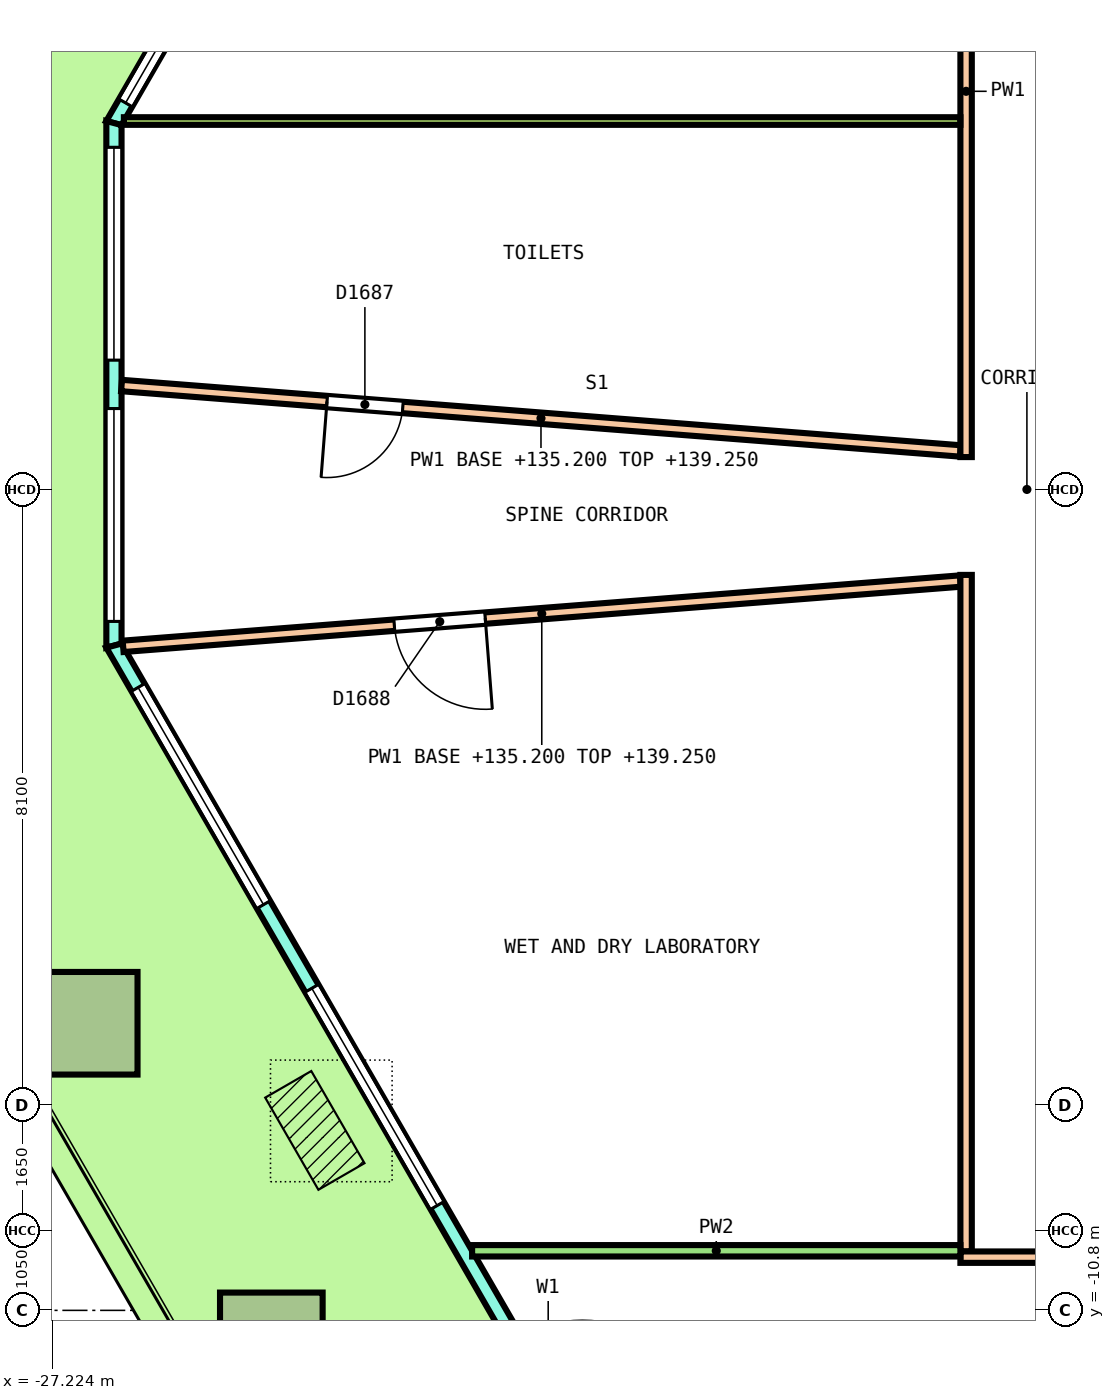
"""IFC4 building model, lengths in metres.
Left out: names, types, materials, properties, quantities, classifications, styles, units other than length and angle.
Written with IfcOpenShell. Run it as: python <this file> out.ifc"""

import sys

from ifc_helpers import new_model, si_unit, direction, frame, frame_2d, origin, origin_2d, place, context, subcontext, project, spatial, polyline, rectangle, outline, extrude, element, fill, save


model = new_model("IFC4")
c1 = context("Model", 3, precision=1e-05, world=origin(), true_north=direction((0.0, 1.0)))
c2 = subcontext(c1, "Body", "Model", "MODEL_VIEW")
j1 = project(units=[si_unit("LENGTHUNIT", "METRE"), si_unit("PLANEANGLEUNIT", "RADIAN")], contexts=[c1])
p1 = place(None, origin())
s1 = spatial("IfcSite", under=j1, at=p1, CompositionType="ELEMENT")
p2 = place(p1, origin())
s2 = spatial("IfcBuilding", under=s1, at=p2, CompositionType="ELEMENT")
p3 = place(p2, frame((0.0, 0.0, 135.2)))
s3 = spatial("IfcBuildingStorey", under=s2, at=p3, CompositionType="ELEMENT", Elevation=135.2)
p4 = place(p3, frame((-26.776, -7.023, 0.0), z_axis=(0.106402456539, -0.184226228858, 0.977107575369), x_axis=(0.488665296242, -0.846135593228, -0.212745825157)))
e1 = element("IfcColumn", 1, at=p4, inside=s3, PredefinedType="COLUMN", context=c2, shape_type="SweptSolid", body=[
    extrude(rectangle(XDim=1.35, YDim=1.35, at=origin_2d()), origin(), (0.0, 0.0, 1.0), 4.135),
])
p5 = place(p3, frame((-24.341, -11.241, 0.0), z_axis=(0.03619386332, -0.062707972497, 0.997375412993), x_axis=(0.498665845075, -0.863765066122, -0.072403629074)))
e2 = element("IfcColumn", 2, at=p5, inside=s3, PredefinedType="COLUMN", context=c2, shape_type="SweptSolid", body=[
    extrude(rectangle(XDim=1.35, YDim=1.35, at=origin_2d()), origin(), (0.0, 0.0, 1.0), 4.061),
])
p6 = place(p3, frame((-17.38, 20.463, 0.0), z_axis=(0.0, 0.0, 1.0), x_axis=(-0.500000137386, -0.866025324465, 0.0)))
e3 = element("IfcWall", 3, at=p6, inside=s3, PredefinedType="SOLIDWALL", context=c2, shape_type="SweptSolid", body=[
    extrude(outline(polyline([(-0.027, -0.1), (0.979, -0.1), (1.986, -0.1), (2.992, -0.1), (3.999, -0.1), (5.005, -0.1), (6.012, -0.1), (7.018, -0.1), (8.025, -0.1), (9.031, -0.1), (10.038, -0.1), (11.044, -0.1), (12.051, -0.1), (13.057, -0.1), (14.063, -0.1), (15.07, -0.1), (16.076, -0.1), (17.083, -0.1), (18.089, -0.1), (18.036, 0.1), (17.035, 0.1), (16.035, 0.1), (15.034, 0.1), (14.034, 0.1), (13.033, 0.1), (12.033, 0.1), (11.032, 0.1), (10.032, 0.1), (9.031, 0.1), (8.031, 0.1), (7.03, 0.1), (6.03, 0.1), (5.029, 0.1), (4.029, 0.1), (3.028, 0.1), (2.028, 0.1), (1.027, 0.1), (0.027, 0.1), (-0.027, -0.1)])), origin(), (0.0, 0.0, 1.0), 4.1),
])
p7 = place(p6, frame((0.306, 0.0, 0.1)))
e4 = element("IfcOpeningElement", 4, at=p7, cuts=e3, PredefinedType="OPENING", context=c2, shape_type="SweptSolid", body=[
    extrude(rectangle(XDim=3.0, YDim=2.9, at=frame_2d((1.5, 1.45))), frame((0.0, 0.11, 0.0), z_axis=(0.0, -1.0, 0.0), x_axis=(1.0, 0.0, 0.0)), (0.0, 0.0, 1.0), 0.22),
])
p8 = place(p6, frame((3.919, 0.0, 0.1)))
e5 = element("IfcOpeningElement", 5, at=p8, cuts=e3, PredefinedType="OPENING", context=c2, shape_type="SweptSolid", body=[
    extrude(rectangle(XDim=3.0, YDim=2.9, at=frame_2d((1.5, 1.45))), frame((0.0, 0.11, 0.0), z_axis=(0.0, -1.0, 0.0), x_axis=(1.0, 0.0, 0.0)), (0.0, 0.0, 1.0), 0.22),
])
p9 = place(p6, frame((8.131, 0.0, 0.0)))
e6 = element("IfcOpeningElement", 6, at=p9, cuts=e3, PredefinedType="OPENING", context=c2, shape_type="SweptSolid", body=[
    extrude(rectangle(XDim=1.8, YDim=2.4, at=frame_2d((0.9, 1.2))), frame((0.0, 0.11, 0.0), z_axis=(0.0, -1.0, 0.0), x_axis=(1.0, 0.0, 0.0)), (0.0, 0.0, 1.0), 0.22),
])
p10 = place(p6, frame((8.131, 0.0, 2.55)))
e7 = element("IfcOpeningElement", 7, at=p10, cuts=e3, PredefinedType="OPENING", context=c2, shape_type="SweptSolid", body=[
    extrude(rectangle(XDim=1.8, YDim=0.45, at=frame_2d((0.9, 0.225))), frame((0.0, 0.11, 0.0), z_axis=(0.0, -1.0, 0.0), x_axis=(1.0, 0.0, 0.0)), (0.0, 0.0, 1.0), 0.22),
])
p11 = place(p6, frame((11.144, 0.0, 0.1)))
e8 = element("IfcOpeningElement", 8, at=p11, cuts=e3, PredefinedType="OPENING", context=c2, shape_type="SweptSolid", body=[
    extrude(rectangle(XDim=3.0, YDim=2.9, at=frame_2d((1.5, 1.45))), frame((0.0, 0.11, 0.0), z_axis=(0.0, -1.0, 0.0), x_axis=(1.0, 0.0, 0.0)), (0.0, 0.0, 1.0), 0.22),
])
p12 = place(p6, frame((14.756, 0.0, 0.1)))
e9 = element("IfcOpeningElement", 9, at=p12, cuts=e3, PredefinedType="OPENING", context=c2, shape_type="SweptSolid", body=[
    extrude(rectangle(XDim=3.0, YDim=2.9, at=frame_2d((1.5, 1.45))), frame((0.0, 0.11, 0.0), z_axis=(0.0, -1.0, 0.0), x_axis=(1.0, 0.0, 0.0)), (0.0, 0.0, 1.0), 0.22),
])
p13 = place(p3, frame((-26.411, 4.82, 0.0), z_axis=(0.0, 0.0, 1.0), x_axis=(0.0, -1.0, 0.0)))
e10 = element("IfcWall", 10, at=p13, inside=s3, PredefinedType="SOLIDWALL", context=c2, shape_type="SweptSolid", body=[
    extrude(outline(polyline([(-0.027, -0.1), (1.128, -0.1), (2.283, -0.1), (3.438, -0.1), (4.592, -0.1), (5.747, -0.1), (6.902, -0.1), (6.848, 0.1), (5.711, 0.1), (4.574, 0.1), (3.438, 0.1), (2.301, 0.1), (1.164, 0.1), (0.027, 0.1), (-0.027, -0.1)])), origin(), (0.0, 0.0, 1.0), 4.1),
])
p14 = place(p13, frame((0.319, 0.0, 0.1)))
e11 = element("IfcOpeningElement", 11, at=p14, cuts=e10, PredefinedType="OPENING", context=c2, shape_type="SweptSolid", body=[
    extrude(rectangle(XDim=2.8, YDim=2.9, at=frame_2d((1.4, 1.45))), frame((0.0, 0.11, 0.0), z_axis=(0.0, -1.0, 0.0), x_axis=(1.0, 0.0, 0.0)), (0.0, 0.0, 1.0), 0.22),
])
p15 = place(p13, frame((3.756, 0.0, 0.1)))
e12 = element("IfcOpeningElement", 12, at=p15, cuts=e10, PredefinedType="OPENING", context=c2, shape_type="SweptSolid", body=[
    extrude(rectangle(XDim=2.8, YDim=2.9, at=frame_2d((1.4, 1.45))), frame((0.0, 0.11, 0.0), z_axis=(0.0, -1.0, 0.0), x_axis=(1.0, 0.0, 0.0)), (0.0, 0.0, 1.0), 0.22),
])
p16 = place(p3, frame((-26.411, -2.055, 0.0), z_axis=(0.0, 0.0, 1.0), x_axis=(0.50000204422, -0.86602422355, 0.0)))
e13 = element("IfcWall", 13, at=p16, inside=s3, PredefinedType="SOLIDWALL", context=c2, shape_type="SweptSolid", body=[
    extrude(outline(polyline([(-0.027, -0.1), (1.014, -0.1), (2.055, -0.1), (3.097, -0.1), (4.138, -0.1), (5.179, -0.1), (6.22, -0.1), (7.261, -0.1), (8.303, -0.1), (9.344, -0.1), (10.385, -0.1), (11.426, -0.1), (12.468, -0.1), (13.509, -0.1), (14.55, -0.1), (15.591, -0.1), (16.632, -0.1), (17.673, -0.1), (18.715, -0.1), (19.756, -0.1), (20.797, -0.1), (21.838, -0.1), (22.879, -0.1), (22.826, 0.1), (21.789, 0.1), (20.753, 0.1), (19.717, 0.1), (18.68, 0.1), (17.644, 0.1), (16.608, 0.1), (15.572, 0.1), (14.535, 0.1), (13.499, 0.1), (12.463, 0.1), (11.426, 0.1), (10.39, 0.1), (9.354, 0.1), (8.317, 0.1), (7.281, 0.1), (6.245, 0.1), (5.208, 0.1), (4.172, 0.1), (3.136, 0.1), (2.099, 0.1), (1.063, 0.1), (0.027, 0.1), (-0.027, -0.1)])), origin(), (0.0, 0.0, 1.0), 4.1),
])
p17 = place(p16, frame((0.635, 0.0, 0.1)))
e14 = element("IfcOpeningElement", 14, at=p17, cuts=e13, PredefinedType="OPENING", context=c2, shape_type="SweptSolid", body=[
    extrude(rectangle(XDim=3.3, YDim=2.9, at=frame_2d((1.65, 1.45))), frame((0.0, 0.11, 0.0), z_axis=(0.0, -1.0, 0.0), x_axis=(1.0, 0.0, 0.0)), (0.0, 0.0, 1.0), 0.22),
])
p18 = place(p16, frame((5.206, 0.0, 0.1)))
e15 = element("IfcOpeningElement", 15, at=p18, cuts=e13, PredefinedType="OPENING", context=c2, shape_type="SweptSolid", body=[
    extrude(rectangle(XDim=3.3, YDim=2.9, at=frame_2d((1.65, 1.45))), frame((0.0, 0.11, 0.0), z_axis=(0.0, -1.0, 0.0), x_axis=(1.0, 0.0, 0.0)), (0.0, 0.0, 1.0), 0.22),
])
p19 = place(p16, frame((10.526, 0.0, 0.0)))
e16 = element("IfcOpeningElement", 16, at=p19, cuts=e13, PredefinedType="OPENING", context=c2, shape_type="SweptSolid", body=[
    extrude(rectangle(XDim=1.8, YDim=2.4, at=frame_2d((0.9, 1.2))), frame((0.0, 0.11, 0.0), z_axis=(0.0, -1.0, 0.0), x_axis=(1.0, 0.0, 0.0)), (0.0, 0.0, 1.0), 0.22),
])
p20 = place(p16, frame((10.526, 0.0, 2.55)))
e17 = element("IfcOpeningElement", 17, at=p20, cuts=e13, PredefinedType="OPENING", context=c2, shape_type="SweptSolid", body=[
    extrude(rectangle(XDim=1.8, YDim=0.45, at=frame_2d((0.9, 0.225))), frame((0.0, 0.11, 0.0), z_axis=(0.0, -1.0, 0.0), x_axis=(1.0, 0.0, 0.0)), (0.0, 0.0, 1.0), 0.22),
])
p21 = place(p16, frame((14.347, 0.0, 0.1)))
e18 = element("IfcOpeningElement", 18, at=p21, cuts=e13, PredefinedType="OPENING", context=c2, shape_type="SweptSolid", body=[
    extrude(rectangle(XDim=3.3, YDim=2.9, at=frame_2d((1.65, 1.45))), frame((0.0, 0.11, 0.0), z_axis=(0.0, -1.0, 0.0), x_axis=(1.0, 0.0, 0.0)), (0.0, 0.0, 1.0), 0.22),
])
p22 = place(p16, frame((18.917, 0.0, 0.1)))
e19 = element("IfcOpeningElement", 19, at=p22, cuts=e13, PredefinedType="OPENING", context=c2, shape_type="SweptSolid", body=[
    extrude(rectangle(XDim=3.3, YDim=2.9, at=frame_2d((1.65, 1.45))), frame((0.0, 0.11, 0.0), z_axis=(0.0, -1.0, 0.0), x_axis=(1.0, 0.0, 0.0)), (0.0, 0.0, 1.0), 0.22),
])
p23 = place(p3, frame((-26.311, 1.367, 0.0), z_axis=(0.0, 0.0, 1.0), x_axis=(0.996973369859, -0.077743808706, 0.0)))
e20 = element("IfcWall", 20, at=p23, inside=s3, PredefinedType="PARTITIONING", context=c2, shape_type="SweptSolid", body=[
    extrude(rectangle(XDim=11.07, YDim=0.15, at=frame_2d((5.535, 0.0))), origin(), (0.0, 0.0, 1.0), 4.05),
])
p24 = place(p23, frame((2.711, 0.0, 0.0)))
e21 = element("IfcOpeningElement", 21, at=p24, cuts=e20, PredefinedType="OPENING", context=c2, shape_type="SweptSolid", body=[
    extrude(rectangle(XDim=1.0, YDim=2.1, at=frame_2d((0.5, 1.05))), frame((0.0, 0.085, 0.0), z_axis=(0.0, -1.0, 0.0), x_axis=(1.0, 0.0, 0.0)), (0.0, 0.0, 1.0), 0.17),
])
p25 = place(p3, frame((-26.29, -2.064, 0.0), z_axis=(0.0, 0.0, 1.0), x_axis=(0.99697229372, 0.077757607695, 0.0)))
e22 = element("IfcWall", 22, at=p25, inside=s3, PredefinedType="PARTITIONING", context=c2, shape_type="SweptSolid", body=[
    extrude(rectangle(XDim=11.049, YDim=0.15, at=frame_2d((5.524, 0.0))), origin(), (0.0, 0.0, 1.0), 4.05),
])
p26 = place(p25, frame((3.578, 0.0, 0.0)))
e23 = element("IfcOpeningElement", 23, at=p26, cuts=e22, PredefinedType="OPENING", context=c2, shape_type="SweptSolid", body=[
    extrude(rectangle(XDim=1.2, YDim=2.1, at=frame_2d((0.6, 1.05))), frame((0.0, 0.085, 0.0), z_axis=(0.0, -1.0, 0.0), x_axis=(1.0, 0.0, 0.0)), (0.0, 0.0, 1.0), 0.17),
])
p27 = place(p3, frame((-15.2, -10.025, 0.0), z_axis=(0.0, 0.0, 1.0), x_axis=(0.0, 1.0, 0.0)))
e24 = element("IfcWall", 24, at=p27, inside=s3, PredefinedType="PARTITIONING", context=c2, shape_type="SweptSolid", body=[
    extrude(rectangle(XDim=8.901, YDim=0.15, at=frame_2d((4.45, 0.0))), origin(), (0.0, 0.0, 1.0), 3.05),
])
p28 = place(p3, frame((-15.2, 0.426, 0.0), z_axis=(0.0, 0.0, 1.0), x_axis=(0.0, 1.0, 0.0)))
e25 = element("IfcWall", 25, at=p28, inside=s3, PredefinedType="PARTITIONING", context=c2, shape_type="SweptSolid", body=[
    extrude(rectangle(XDim=9.624, YDim=0.15, at=frame_2d((4.812, 0.0))), origin(), (0.0, 0.0, 1.0), 3.05),
])
p29 = place(p28, frame((6.951, 0.0, 0.0)))
e26 = element("IfcOpeningElement", 26, at=p29, cuts=e25, PredefinedType="OPENING", context=c2, shape_type="SweptSolid", body=[
    extrude(rectangle(XDim=1.2, YDim=2.1, at=frame_2d((0.6, 1.05))), frame((0.0, 0.085, 0.0), z_axis=(0.0, -1.0, 0.0), x_axis=(1.0, 0.0, 0.0)), (0.0, 0.0, 1.0), 0.17),
])
p30 = place(p3, frame((-15.275, -10.1, 0.0), z_axis=(0.0, 0.0, 1.0), x_axis=(1.0, 0.0, 0.0)))
e27 = element("IfcWall", 27, at=p30, inside=s3, PredefinedType="PARTITIONING", context=c2, shape_type="SweptSolid", body=[
    extrude(rectangle(XDim=30.4, YDim=0.15, at=frame_2d((15.2, 0.0))), origin(), (0.0, 0.0, 1.0), 3.05),
])
p31 = place(p30, frame((1.506, 0.0, 0.0)))
e28 = element("IfcOpeningElement", 28, at=p31, cuts=e27, PredefinedType="OPENING", context=c2, shape_type="SweptSolid", body=[
    extrude(rectangle(XDim=1.0, YDim=2.1, at=frame_2d((0.5, 1.05))), frame((0.0, 0.085, 0.0), z_axis=(0.0, -1.0, 0.0), x_axis=(1.0, 0.0, 0.0)), (0.0, 0.0, 1.0), 0.17),
])
p32 = place(p30, frame((7.84, 0.0, 0.0)))
e29 = element("IfcOpeningElement", 29, at=p32, cuts=e27, PredefinedType="OPENING", context=c2, shape_type="SweptSolid", body=[
    extrude(rectangle(XDim=1.0, YDim=2.1, at=frame_2d((0.5, 1.05))), frame((0.0, 0.085, 0.0), z_axis=(0.0, -1.0, 0.0), x_axis=(1.0, 0.0, 0.0)), (0.0, 0.0, 1.0), 0.17),
])
p33 = place(p30, frame((15.685, 0.0, 0.0)))
e30 = element("IfcOpeningElement", 30, at=p33, cuts=e27, PredefinedType="OPENING", context=c2, shape_type="SweptSolid", body=[
    extrude(rectangle(XDim=1.2, YDim=2.1, at=frame_2d((0.6, 1.05))), frame((0.0, 0.085, 0.0), z_axis=(0.0, -1.0, 0.0), x_axis=(1.0, 0.0, 0.0)), (0.0, 0.0, 1.0), 0.17),
])
p34 = place(p30, frame((23.812, 0.0, 0.0)))
e31 = element("IfcOpeningElement", 31, at=p34, cuts=e27, PredefinedType="OPENING", context=c2, shape_type="SweptSolid", body=[
    extrude(rectangle(XDim=1.2, YDim=2.1, at=frame_2d((0.6, 1.05))), frame((0.0, 0.085, 0.0), z_axis=(0.0, -1.0, 0.0), x_axis=(1.0, 0.0, 0.0)), (0.0, 0.0, 1.0), 0.17),
])
p35 = place(p3, frame((-21.699, -10.016, 0.0), z_axis=(0.0, 0.0, 1.0), x_axis=(1.0, 0.0, 0.0)))
e32 = element("IfcWall", 32, at=p35, inside=s3, PredefinedType="PARTITIONING", context=c2, shape_type="SweptSolid", body=[
    extrude(rectangle(XDim=6.424, YDim=0.15, at=frame_2d((3.212, 0.0))), origin(), (0.0, 0.0, 1.0), 3.05),
])
p36 = place(p3, frame((-26.28, 4.847, 0.0), z_axis=(0.0, 0.0, 1.0), x_axis=(1.0, 0.0, 0.0)))
e33 = element("IfcWall", 33, at=p36, inside=s3, PredefinedType="PARTITIONING", context=c2, shape_type="SweptSolid", body=[
    extrude(rectangle(XDim=11.005, YDim=0.1, at=frame_2d((5.503, 0.0))), origin(), (0.0, 0.0, 1.0), 3.05),
])
p37 = place(p12, origin())
e34 = element("IfcWindow", 34, at=p37, inside=s3, PartitioningType="SINGLE_PANEL", PredefinedType="WINDOW", context=c2, shape_type="SweptSolid", body=[
    extrude(rectangle(XDim=3.0, YDim=2.9, at=frame_2d((1.5, 1.45))), frame((0.0, 0.03, 0.0), z_axis=(0.0, -1.0, 0.0), x_axis=(1.0, 0.0, 0.0)), (0.0, 0.0, 1.0), 0.06),
])
fill(e9, e34)
p38 = place(p14, origin())
e35 = element("IfcWindow", 35, at=p38, inside=s3, PartitioningType="SINGLE_PANEL", PredefinedType="WINDOW", context=c2, shape_type="SweptSolid", body=[
    extrude(rectangle(XDim=2.8, YDim=2.9, at=frame_2d((1.4, 1.45))), frame((0.0, 0.03, 0.0), z_axis=(0.0, -1.0, 0.0), x_axis=(1.0, 0.0, 0.0)), (0.0, 0.0, 1.0), 0.06),
])
fill(e11, e35)
p39 = place(p15, origin())
e36 = element("IfcWindow", 36, at=p39, inside=s3, PartitioningType="SINGLE_PANEL", PredefinedType="WINDOW", context=c2, shape_type="SweptSolid", body=[
    extrude(rectangle(XDim=2.8, YDim=2.9, at=frame_2d((1.4, 1.45))), frame((0.0, 0.03, 0.0), z_axis=(0.0, -1.0, 0.0), x_axis=(1.0, 0.0, 0.0)), (0.0, 0.0, 1.0), 0.06),
])
fill(e12, e36)
p40 = place(p17, origin())
e37 = element("IfcWindow", 37, at=p40, inside=s3, PartitioningType="SINGLE_PANEL", PredefinedType="WINDOW", context=c2, shape_type="SweptSolid", body=[
    extrude(rectangle(XDim=3.3, YDim=2.9, at=frame_2d((1.65, 1.45))), frame((0.0, 0.03, 0.0), z_axis=(0.0, -1.0, 0.0), x_axis=(1.0, 0.0, 0.0)), (0.0, 0.0, 1.0), 0.06),
])
fill(e14, e37)
p41 = place(p18, origin())
e38 = element("IfcWindow", 38, at=p41, inside=s3, PartitioningType="SINGLE_PANEL", PredefinedType="WINDOW", context=c2, shape_type="SweptSolid", body=[
    extrude(rectangle(XDim=3.3, YDim=2.9, at=frame_2d((1.65, 1.45))), frame((0.0, 0.03, 0.0), z_axis=(0.0, -1.0, 0.0), x_axis=(1.0, 0.0, 0.0)), (0.0, 0.0, 1.0), 0.06),
])
fill(e15, e38)
p42 = place(p24, origin())
e39 = element("IfcDoor", 39, at=p42, inside=s3, OperationType="SINGLE_SWING_LEFT", PredefinedType="DOOR", context=c2, shape_type="SweptSolid", body=[
    extrude(rectangle(XDim=1.0, YDim=2.1, at=frame_2d((0.5, 1.05))), frame((0.0, 0.025, 0.0), z_axis=(0.0, -1.0, 0.0), x_axis=(1.0, 0.0, 0.0)), (0.0, 0.0, 1.0), 0.05),
])
fill(e21, e39)
p43 = place(p26, origin())
e40 = element("IfcDoor", 40, at=p43, inside=s3, OperationType="DOUBLE_DOOR_SINGLE_SWING", PredefinedType="DOOR", context=c2, shape_type="SweptSolid", body=[
    extrude(rectangle(XDim=1.2, YDim=2.1, at=frame_2d((0.6, 1.05))), frame((0.0, 0.025, 0.0), z_axis=(0.0, -1.0, 0.0), x_axis=(1.0, 0.0, 0.0)), (0.0, 0.0, 1.0), 0.05),
])
fill(e23, e40)
save(model, sys.argv[1])
